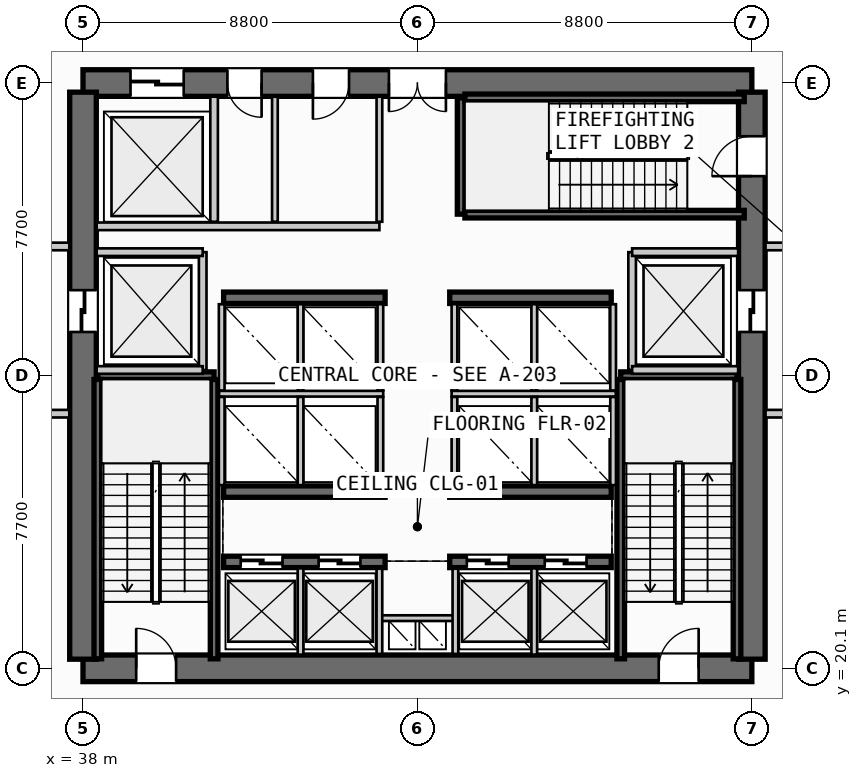
"""IFC4 building model, lengths in metres.
Left out: names, types, materials, properties, quantities, classifications, styles, units other than length and angle.
Written with IfcOpenShell. Run it as: python <this file> out.ifc"""

import sys

from ifc_helpers import new_model, si_unit, direction, frame, frame_2d, origin, place, context, subcontext, project, spatial, rectangle, extrude, source, transform, mapped, element, fill, save


model = new_model("IFC4")
c1 = context("Model", 3, precision=1e-05, world=origin(), true_north=direction((0.0, 1.0)))
c2 = subcontext(c1, "Body", "Model", "MODEL_VIEW")
j1 = project(units=[si_unit("LENGTHUNIT", "METRE"), si_unit("PLANEANGLEUNIT", "RADIAN")], contexts=[c1])
p1 = place(None, origin())
s1 = spatial("IfcSite", under=j1, at=p1, CompositionType="ELEMENT")
p2 = place(p1, origin())
s2 = spatial("IfcBuilding", under=s1, at=p2, CompositionType="ELEMENT")
p3 = place(p2, frame((0.0, 0.0, 10.0)))
s3 = spatial("IfcBuildingStorey", under=s2, at=p3, CompositionType="ELEMENT", Elevation=10.0)
p4 = place(p3, frame((38.0, 20.1, 0.0), z_axis=(0.0, 0.0, 1.0), x_axis=(1.0, 0.0, 0.0)))
e1 = element("IfcWall", 1, at=p4, inside=s3, PredefinedType="SHEAR", context=c2, shape_type="SweptSolid", body=[
    extrude(rectangle(XDim=17.6, YDim=0.7, at=frame_2d((8.8, 0.0))), origin(), (0.0, 0.0, 1.0), 4.53),
])
p5 = place(p4, frame((1.4, 0.0, 0.0)))
e2 = element("IfcOpeningElement", 2, at=p5, cuts=e1, PredefinedType="OPENING", context=c2, shape_type="SweptSolid", body=[
    extrude(rectangle(XDim=1.05, YDim=2.15, at=frame_2d((0.525, 1.075))), frame((0.0, 0.36, 0.0), z_axis=(0.0, -1.0, 0.0), x_axis=(1.0, 0.0, 0.0)), (0.0, 0.0, 1.0), 0.72),
])
p6 = place(p4, frame((15.15, 0.0, 0.0)))
e3 = element("IfcOpeningElement", 3, at=p6, cuts=e1, PredefinedType="OPENING", context=c2, shape_type="SweptSolid", body=[
    extrude(rectangle(XDim=1.05, YDim=2.15, at=frame_2d((0.525, 1.075))), frame((0.0, 0.36, 0.0), z_axis=(0.0, -1.0, 0.0), x_axis=(1.0, 0.0, 0.0)), (0.0, 0.0, 1.0), 0.72),
])
p7 = place(p3, frame((55.6, 35.5, 0.0), z_axis=(0.0, 0.0, 1.0), x_axis=(-1.0, 0.0, 0.0)))
e4 = element("IfcWall", 4, at=p7, inside=s3, PredefinedType="SHEAR", context=c2, shape_type="SweptSolid", body=[
    extrude(rectangle(XDim=17.6, YDim=0.7, at=frame_2d((8.8, 0.0))), origin(), (0.0, 0.0, 1.0), 4.53),
])
p8 = place(p7, frame((8.05, 0.0, 0.0)))
e5 = element("IfcOpeningElement", 5, at=p8, cuts=e4, PredefinedType="OPENING", context=c2, shape_type="SweptSolid", body=[
    extrude(rectangle(XDim=1.5, YDim=2.2, at=frame_2d((0.75, 1.1))), frame((0.0, 0.36, 0.0), z_axis=(0.0, -1.0, 0.0), x_axis=(1.0, 0.0, 0.0)), (0.0, 0.0, 1.0), 0.72),
])
p9 = place(p7, frame((14.95, 0.0, 0.0)))
e6 = element("IfcOpeningElement", 6, at=p9, cuts=e4, PredefinedType="OPENING", context=c2, shape_type="SweptSolid", body=[
    extrude(rectangle(XDim=1.4, YDim=2.3, at=frame_2d((0.7, 1.15))), frame((0.0, 0.36, 0.0), z_axis=(0.0, -1.0, 0.0), x_axis=(1.0, 0.0, 0.0)), (0.0, 0.0, 1.0), 0.72),
])
p10 = place(p7, frame((12.9, 0.0, 0.0)))
e7 = element("IfcOpeningElement", 7, at=p10, cuts=e4, PredefinedType="OPENING", context=c2, shape_type="SweptSolid", body=[
    extrude(rectangle(XDim=0.9, YDim=2.15, at=frame_2d((0.45, 1.075))), frame((0.0, 0.36, 0.0), z_axis=(0.0, -1.0, 0.0), x_axis=(1.0, 0.0, 0.0)), (0.0, 0.0, 1.0), 0.72),
])
p11 = place(p7, frame((10.6, 0.0, 0.0)))
e8 = element("IfcOpeningElement", 8, at=p11, cuts=e4, PredefinedType="OPENING", context=c2, shape_type="SweptSolid", body=[
    extrude(rectangle(XDim=0.95, YDim=2.15, at=frame_2d((0.475, 1.075))), frame((0.0, 0.36, 0.0), z_axis=(0.0, -1.0, 0.0), x_axis=(1.0, 0.0, 0.0)), (0.0, 0.0, 1.0), 0.72),
])
p12 = place(p3, frame((38.0, 35.26, 0.0), z_axis=(0.0, 0.0, 1.0), x_axis=(0.0, -1.0, 0.0)))
e9 = element("IfcWall", 9, at=p12, inside=s3, PredefinedType="SHEAR", context=c2, shape_type="SweptSolid", body=[
    extrude(rectangle(XDim=14.92, YDim=0.7, at=frame_2d((7.46, 0.0))), origin(), (0.0, 0.0, 1.0), 4.53),
])
p13 = place(p12, frame((5.21, 0.0, 0.0)))
e10 = element("IfcOpeningElement", 10, at=p13, cuts=e9, PredefinedType="OPENING", context=c2, shape_type="SweptSolid", body=[
    extrude(rectangle(XDim=1.1, YDim=2.2, at=frame_2d((0.55, 1.1))), frame((0.0, 0.36, 0.0), z_axis=(0.0, -1.0, 0.0), x_axis=(1.0, 0.0, 0.0)), (0.0, 0.0, 1.0), 0.72),
])
p14 = place(p3, frame((55.6, 20.34, 0.0), z_axis=(0.0, 0.0, 1.0), x_axis=(0.0, 1.0, 0.0)))
e11 = element("IfcWall", 11, at=p14, inside=s3, PredefinedType="SHEAR", context=c2, shape_type="SweptSolid", body=[
    extrude(rectangle(XDim=14.92, YDim=0.7, at=frame_2d((7.46, 0.0))), origin(), (0.0, 0.0, 1.0), 4.53),
])
p15 = place(p14, frame((12.71, 0.0, 0.0)))
e12 = element("IfcOpeningElement", 12, at=p15, cuts=e11, PredefinedType="OPENING", context=c2, shape_type="SweptSolid", body=[
    extrude(rectangle(XDim=1.05, YDim=2.15, at=frame_2d((0.525, 1.075))), frame((0.0, 0.36, 0.0), z_axis=(0.0, -1.0, 0.0), x_axis=(1.0, 0.0, 0.0)), (0.0, 0.0, 1.0), 0.72),
])
p16 = place(p14, frame((8.61, 0.0, 0.0)))
e13 = element("IfcOpeningElement", 13, at=p16, cuts=e11, PredefinedType="OPENING", context=c2, shape_type="SweptSolid", body=[
    extrude(rectangle(XDim=1.1, YDim=2.2, at=frame_2d((0.55, 1.1))), frame((0.0, 0.36, 0.0), z_axis=(0.0, -1.0, 0.0), x_axis=(1.0, 0.0, 0.0)), (0.0, 0.0, 1.0), 0.72),
])
p17 = place(p3, frame((41.7, 22.9, 0.0), z_axis=(0.0, 0.0, 1.0), x_axis=(1.0, 0.0, 0.0)))
e14 = element("IfcWall", 14, at=p17, inside=s3, PredefinedType="SHEAR", context=c2, shape_type="SweptSolid", body=[
    extrude(rectangle(XDim=4.25, YDim=0.3, at=frame_2d((2.125, 0.0))), origin(), (0.0, 0.0, 1.0), 4.53),
])
p18 = place(p17, frame((0.45, 0.0, 0.0)))
e15 = element("IfcOpeningElement", 15, at=p18, cuts=e14, PredefinedType="OPENING", context=c2, shape_type="SweptSolid", body=[
    extrude(rectangle(XDim=1.1, YDim=2.2, at=frame_2d((0.55, 1.1))), frame((0.0, 0.16, 0.0), z_axis=(0.0, -1.0, 0.0), x_axis=(1.0, 0.0, 0.0)), (0.0, 0.0, 1.0), 0.32),
])
p19 = place(p17, frame((2.5, 0.0, 0.0)))
e16 = element("IfcOpeningElement", 16, at=p19, cuts=e14, PredefinedType="OPENING", context=c2, shape_type="SweptSolid", body=[
    extrude(rectangle(XDim=1.1, YDim=2.2, at=frame_2d((0.55, 1.1))), frame((0.0, 0.16, 0.0), z_axis=(0.0, -1.0, 0.0), x_axis=(1.0, 0.0, 0.0)), (0.0, 0.0, 1.0), 0.32),
])
p20 = place(p3, frame((47.65, 22.9, 0.0), z_axis=(0.0, 0.0, 1.0), x_axis=(1.0, 0.0, 0.0)))
e17 = element("IfcWall", 17, at=p20, inside=s3, PredefinedType="SHEAR", context=c2, shape_type="SweptSolid", body=[
    extrude(rectangle(XDim=4.25, YDim=0.3, at=frame_2d((2.125, 0.0))), origin(), (0.0, 0.0, 1.0), 4.53),
])
p21 = place(p20, frame((0.45, 0.0, 0.0)))
e18 = element("IfcOpeningElement", 18, at=p21, cuts=e17, PredefinedType="OPENING", context=c2, shape_type="SweptSolid", body=[
    extrude(rectangle(XDim=1.1, YDim=2.2, at=frame_2d((0.55, 1.1))), frame((0.0, 0.16, 0.0), z_axis=(0.0, -1.0, 0.0), x_axis=(1.0, 0.0, 0.0)), (0.0, 0.0, 1.0), 0.32),
])
p22 = place(p20, frame((2.5, 0.0, 0.0)))
e19 = element("IfcOpeningElement", 19, at=p22, cuts=e17, PredefinedType="OPENING", context=c2, shape_type="SweptSolid", body=[
    extrude(rectangle(XDim=1.1, YDim=2.2, at=frame_2d((0.55, 1.1))), frame((0.0, 0.16, 0.0), z_axis=(0.0, -1.0, 0.0), x_axis=(1.0, 0.0, 0.0)), (0.0, 0.0, 1.0), 0.32),
])
for number, where, z_axis, x_axis in (
    (20, (41.7, 24.75, 0.0), (0.0, 0.0, 1.0), (1.0, 0.0, 0.0)),
    (21, (47.65, 24.75, 0.0), (0.0, 0.0, 1.0), (1.0, 0.0, 0.0)),
    (22, (41.7, 29.85, 0.0), (0.0, 0.0, 1.0), (1.0, 0.0, 0.0)),
    (23, (47.65, 29.85, 0.0), (0.0, 0.0, 1.0), (1.0, 0.0, 0.0)),
):
    element("IfcWall", number, at=place(p3, frame(where, z_axis=z_axis, x_axis=x_axis)), inside=s3, PredefinedType="SHEAR", context=c2, shape_type="SweptSolid", body=[
        extrude(rectangle(XDim=4.25, YDim=0.3, at=frame_2d((2.125, 0.0))), origin(), (0.0, 0.0, 1.0), 4.53),
    ])
p23 = place(p3, frame((38.39, 27.8, 0.0), z_axis=(0.0, 0.0, 1.0), x_axis=(1.0, 0.0, 0.0)))
e24 = element("IfcWall", 24, at=p23, inside=s3, PredefinedType="SHEAR", context=c2, shape_type="SweptSolid", body=[
    extrude(rectangle(XDim=3.06, YDim=0.2, at=frame_2d((1.53, 0.0))), origin(), (0.0, 0.0, 1.0), 4.53),
])
for number, where, z_axis, x_axis in (
    (25, (41.45, 27.7, 0.0), (0.0, 0.0, 1.0), (0.0, -1.0, 0.0)),
    (26, (38.39, 20.35, 0.0), (0.0, 0.0, 1.0), (0.0, 1.0, 0.0)),
):
    element("IfcWall", number, at=place(p3, frame(where, z_axis=z_axis, x_axis=x_axis)), inside=s3, PredefinedType="SHEAR", context=c2, shape_type="SweptSolid", body=[
        extrude(rectangle(XDim=7.35, YDim=0.2, at=frame_2d((3.675, 0.0))), origin(), (0.0, 0.0, 1.0), 4.53),
    ])
p24 = place(p3, frame((52.15, 27.8, 0.0), z_axis=(0.0, 0.0, 1.0), x_axis=(1.0, 0.0, 0.0)))
e27 = element("IfcWall", 27, at=p24, inside=s3, PredefinedType="SHEAR", context=c2, shape_type="SweptSolid", body=[
    extrude(rectangle(XDim=3.06, YDim=0.2, at=frame_2d((1.53, 0.0))), origin(), (0.0, 0.0, 1.0), 4.53),
])
for number, where, z_axis, x_axis in (
    (28, (55.21, 27.7, 0.0), (0.0, 0.0, 1.0), (0.0, -1.0, 0.0)),
    (29, (52.15, 20.35, 0.0), (0.0, 0.0, 1.0), (0.0, 1.0, 0.0)),
):
    element("IfcWall", number, at=place(p3, frame(where, z_axis=z_axis, x_axis=x_axis)), inside=s3, PredefinedType="SHEAR", context=c2, shape_type="SweptSolid", body=[
        extrude(rectangle(XDim=7.35, YDim=0.2, at=frame_2d((3.675, 0.0))), origin(), (0.0, 0.0, 1.0), 4.53),
    ])
p25 = place(p3, frame((47.95, 32.05, 0.0), z_axis=(0.0, 0.0, 1.0), x_axis=(0.0, 1.0, 0.0)))
e30 = element("IfcWall", 30, at=p25, inside=s3, PredefinedType="SHEAR", context=c2, shape_type="SweptSolid", body=[
    extrude(rectangle(XDim=3.06, YDim=0.2, at=frame_2d((1.53, 0.0))), origin(), (0.0, 0.0, 1.0), 4.53),
])
for number, where, z_axis, x_axis in (
    (31, (48.05, 35.11, 0.0), (0.0, 0.0, 1.0), (1.0, 0.0, 0.0)),
    (32, (55.4, 32.05, 0.0), (0.0, 0.0, 1.0), (-1.0, 0.0, 0.0)),
):
    element("IfcWall", number, at=place(p3, frame(where, z_axis=z_axis, x_axis=x_axis)), inside=s3, PredefinedType="SHEAR", context=c2, shape_type="SweptSolid", body=[
        extrude(rectangle(XDim=7.35, YDim=0.2, at=frame_2d((3.675, 0.0))), origin(), (0.0, 0.0, 1.0), 4.53),
    ])
p26 = place(p3, frame((45.8, 21.42, 0.0), z_axis=(0.0, 0.0, 1.0), x_axis=(1.0, 0.0, 0.0)))
e33 = element("IfcWall", 33, at=p26, inside=s3, PredefinedType="PARTITIONING", context=c2, shape_type="SweptSolid", body=[
    extrude(rectangle(XDim=2.0, YDim=0.15, at=frame_2d((1.0, 0.0))), origin(), (0.0, 0.0, 1.0), 3.743),
])
for number, where, z_axis, x_axis in (
    (34, (45.8, 20.48, 0.0), (0.0, 0.0, 1.0), (0.0, 1.0, 0.0)),
    (35, (47.8, 20.48, 0.0), (0.0, 0.0, 1.0), (0.0, 1.0, 0.0)),
):
    element("IfcWall", number, at=place(p3, frame(where, z_axis=z_axis, x_axis=x_axis)), inside=s3, PredefinedType="PARTITIONING", context=c2, shape_type="SweptSolid", body=[
        extrude(rectangle(XDim=2.24, YDim=0.15, at=frame_2d((1.12, 0.0))), origin(), (0.0, 0.0, 1.0), 3.743),
    ])
p27 = place(p3, frame((41.15, 27.95, 0.0), z_axis=(0.0, 0.0, 1.0), x_axis=(0.0, 1.0, 0.0)))
e36 = element("IfcWall", 36, at=p27, inside=s3, PredefinedType="PARTITIONING", context=c2, shape_type="SweptSolid", body=[
    extrude(rectangle(XDim=3.1, YDim=0.2, at=frame_2d((1.55, 0.0))), origin(), (0.0, 0.0, 1.0), 3.743),
])
for number, where, z_axis, x_axis in (
    (37, (38.36, 27.95, 0.0), (0.0, 0.0, 1.0), (1.0, 0.0, 0.0)),
    (38, (38.36, 31.05, 0.0), (0.0, 0.0, 1.0), (1.0, 0.0, 0.0)),
):
    element("IfcWall", number, at=place(p3, frame(where, z_axis=z_axis, x_axis=x_axis)), inside=s3, PredefinedType="PARTITIONING", context=c2, shape_type="SweptSolid", body=[
        extrude(rectangle(XDim=2.79, YDim=0.2, at=frame_2d((1.395, 0.0))), origin(), (0.0, 0.0, 1.0), 3.743),
    ])
for number, where, z_axis, x_axis in (
    (39, (34.5, 26.8, 0.0), (0.0, 0.0, 1.0), (1.0, 0.0, 0.0)),
    (40, (34.5, 31.2, 0.0), (0.0, 0.0, 1.0), (1.0, 0.0, 0.0)),
):
    element("IfcWall", number, at=place(p3, frame(where, z_axis=z_axis, x_axis=x_axis)), inside=s3, PredefinedType="PARTITIONING", context=c2, shape_type="SweptSolid", body=[
        extrude(rectangle(XDim=3.14, YDim=0.2, at=frame_2d((1.57, 0.0))), origin(), (0.0, 0.0, 1.0), 3.743),
    ])
p28 = place(p3, frame((52.45, 27.95, 0.0), z_axis=(0.0, 0.0, 1.0), x_axis=(0.0, 1.0, 0.0)))
e41 = element("IfcWall", 41, at=p28, inside=s3, PredefinedType="PARTITIONING", context=c2, shape_type="SweptSolid", body=[
    extrude(rectangle(XDim=3.1, YDim=0.2, at=frame_2d((1.55, 0.0))), origin(), (0.0, 0.0, 1.0), 3.743),
])
for number, where, z_axis, x_axis in (
    (42, (52.45, 27.95, 0.0), (0.0, 0.0, 1.0), (1.0, 0.0, 0.0)),
    (43, (52.45, 31.05, 0.0), (0.0, 0.0, 1.0), (1.0, 0.0, 0.0)),
):
    element("IfcWall", number, at=place(p3, frame(where, z_axis=z_axis, x_axis=x_axis)), inside=s3, PredefinedType="PARTITIONING", context=c2, shape_type="SweptSolid", body=[
        extrude(rectangle(XDim=2.79, YDim=0.2, at=frame_2d((1.395, 0.0))), origin(), (0.0, 0.0, 1.0), 3.743),
    ])
for number, where, z_axis, x_axis in (
    (44, (55.96, 26.8, 0.0), (0.0, 0.0, 1.0), (1.0, 0.0, 0.0)),
    (45, (55.96, 31.2, 0.0), (0.0, 0.0, 1.0), (1.0, 0.0, 0.0)),
):
    element("IfcWall", number, at=place(p3, frame(where, z_axis=z_axis, x_axis=x_axis)), inside=s3, PredefinedType="PARTITIONING", context=c2, shape_type="SweptSolid", body=[
        extrude(rectangle(XDim=3.14, YDim=0.2, at=frame_2d((1.57, 0.0))), origin(), (0.0, 0.0, 1.0), 3.743),
    ])
for number, where, z_axis, x_axis in (
    (46, (43.725, 20.46, 0.0), (0.0, 0.0, 1.0), (0.0, 1.0, 0.0)),
    (47, (49.875, 20.46, 0.0), (0.0, 0.0, 1.0), (0.0, 1.0, 0.0)),
):
    element("IfcWall", number, at=place(p3, frame(where, z_axis=z_axis, x_axis=x_axis)), inside=s3, PredefinedType="PARTITIONING", context=c2, shape_type="SweptSolid", body=[
        extrude(rectangle(XDim=2.27, YDim=0.15, at=frame_2d((1.135, 0.0))), origin(), (0.0, 0.0, 1.0), 3.743),
    ])
p29 = place(p3, frame((41.58, 27.325, 0.0), z_axis=(0.0, 0.0, 1.0), x_axis=(1.0, 0.0, 0.0)))
e48 = element("IfcWall", 48, at=p29, inside=s3, PredefinedType="PARTITIONING", context=c2, shape_type="SweptSolid", body=[
    extrude(rectangle(XDim=4.32, YDim=0.15, at=frame_2d((2.16, 0.0))), origin(), (0.0, 0.0, 1.0), 3.743),
])
p30 = place(p3, frame((47.7, 27.325, 0.0), z_axis=(0.0, 0.0, 1.0), x_axis=(1.0, 0.0, 0.0)))
e49 = element("IfcWall", 49, at=p30, inside=s3, PredefinedType="PARTITIONING", context=c2, shape_type="SweptSolid", body=[
    extrude(rectangle(XDim=4.32, YDim=0.15, at=frame_2d((2.16, 0.0))), origin(), (0.0, 0.0, 1.0), 3.743),
])
for number, where, z_axis, x_axis in (
    (50, (41.65, 24.92, 0.0), (0.0, 0.0, 1.0), (0.0, 1.0, 0.0)),
    (51, (43.725, 24.92, 0.0), (0.0, 0.0, 1.0), (0.0, 1.0, 0.0)),
    (52, (45.825, 24.92, 0.0), (0.0, 0.0, 1.0), (0.0, 1.0, 0.0)),
    (53, (47.775, 24.92, 0.0), (0.0, 0.0, 1.0), (0.0, 1.0, 0.0)),
    (54, (49.875, 24.92, 0.0), (0.0, 0.0, 1.0), (0.0, 1.0, 0.0)),
    (55, (51.95, 24.92, 0.0), (0.0, 0.0, 1.0), (0.0, 1.0, 0.0)),
):
    element("IfcWall", number, at=place(p3, frame(where, z_axis=z_axis, x_axis=x_axis)), inside=s3, PredefinedType="PARTITIONING", context=c2, shape_type="SweptSolid", body=[
        extrude(rectangle(XDim=2.32, YDim=0.15, at=frame_2d((1.16, 0.0))), origin(), (0.0, 0.0, 1.0), 3.743),
    ])
for number, where, z_axis, x_axis in (
    (56, (41.65, 27.41, 0.0), (0.0, 0.0, 1.0), (0.0, 1.0, 0.0)),
    (57, (43.725, 27.41, 0.0), (0.0, 0.0, 1.0), (0.0, 1.0, 0.0)),
    (58, (45.825, 27.41, 0.0), (0.0, 0.0, 1.0), (0.0, 1.0, 0.0)),
    (59, (47.775, 27.41, 0.0), (0.0, 0.0, 1.0), (0.0, 1.0, 0.0)),
    (60, (49.875, 27.41, 0.0), (0.0, 0.0, 1.0), (0.0, 1.0, 0.0)),
    (61, (51.95, 27.41, 0.0), (0.0, 0.0, 1.0), (0.0, 1.0, 0.0)),
):
    element("IfcWall", number, at=place(p3, frame(where, z_axis=z_axis, x_axis=x_axis)), inside=s3, PredefinedType="PARTITIONING", context=c2, shape_type="SweptSolid", body=[
        extrude(rectangle(XDim=2.27, YDim=0.15, at=frame_2d((1.135, 0.0))), origin(), (0.0, 0.0, 1.0), 3.743),
    ])
p31 = place(p3, frame((41.45, 31.85, 0.0), z_axis=(0.0, 0.0, 1.0), x_axis=(0.0, 1.0, 0.0)))
e62 = element("IfcWall", 62, at=p31, inside=s3, PredefinedType="PARTITIONING", context=c2, shape_type="SweptSolid", body=[
    extrude(rectangle(XDim=3.29, YDim=0.2, at=frame_2d((1.645, 0.0))), origin(), (0.0, 0.0, 1.0), 3.743),
])
p32 = place(p3, frame((38.36, 31.73, 0.0), z_axis=(0.0, 0.0, 1.0), x_axis=(1.0, 0.0, 0.0)))
e63 = element("IfcWall", 63, at=p32, inside=s3, PredefinedType="PARTITIONING", context=c2, shape_type="SweptSolid", body=[
    extrude(rectangle(XDim=7.44, YDim=0.2, at=frame_2d((3.72, 0.0))), origin(), (0.0, 0.0, 1.0), 3.743),
])
p33 = place(p3, frame((45.8, 31.85, 0.0), z_axis=(0.0, 0.0, 1.0), x_axis=(0.0, 1.0, 0.0)))
e64 = element("IfcWall", 64, at=p33, inside=s3, PredefinedType="PARTITIONING", context=c2, shape_type="SweptSolid", body=[
    extrude(rectangle(XDim=3.29, YDim=0.15, at=frame_2d((1.645, 0.0))), origin(), (0.0, 0.0, 1.0), 3.743),
])
p34 = place(p3, frame((43.05, 31.85, 0.0), z_axis=(0.0, 0.0, 1.0), x_axis=(0.0, 1.0, 0.0)))
e65 = element("IfcWall", 65, at=p34, inside=s3, PredefinedType="PLUMBINGWALL", context=c2, shape_type="SweptSolid", body=[
    extrude(rectangle(XDim=3.29, YDim=0.15, at=frame_2d((1.645, 0.0))), origin(), (0.0, 0.0, 1.0), 3.743),
])
m1 = source(origin(), c2, "Body", "SweptSolid", [
    extrude(rectangle(XDim=1.05, YDim=2.15, at=frame_2d((0.525, 1.075))), frame((0.0, 0.025, 0.0), z_axis=(0.0, -1.0, 0.0), x_axis=(1.0, 0.0, 0.0)), (0.0, 0.0, 1.0), 0.05),
])
p35 = place(p5, origin())
e66 = element("IfcDoor", 66, at=p35, inside=s3, OperationType="SINGLE_SWING_LEFT", PredefinedType="DOOR", context=c2, shape_type="MappedRepresentation", body=[
    mapped(m1, transform((0.0, 0.0, 0.0), scale=1.0)),
])
fill(e2, e66)
p36 = place(p6, origin())
e67 = element("IfcDoor", 67, at=p36, inside=s3, OperationType="SINGLE_SWING_RIGHT", PredefinedType="DOOR", context=c2, shape_type="MappedRepresentation", body=[
    mapped(m1, transform((0.0, 0.0, 0.0), scale=1.0)),
])
fill(e3, e67)
p37 = place(p15, origin())
e68 = element("IfcDoor", 68, at=p37, inside=s3, OperationType="SINGLE_SWING_LEFT", PredefinedType="DOOR", context=c2, shape_type="MappedRepresentation", body=[
    mapped(m1, transform((0.0, 0.0, 0.0), scale=1.0)),
])
fill(e12, e68)
m2 = source(origin(), c2, "Body", "SweptSolid", [
    extrude(rectangle(XDim=1.5, YDim=2.2, at=frame_2d((0.75, 1.1))), frame((0.0, 0.025, 0.0), z_axis=(0.0, -1.0, 0.0), x_axis=(1.0, 0.0, 0.0)), (0.0, 0.0, 1.0), 0.05),
])
p38 = place(p8, origin())
e69 = element("IfcDoor", 69, at=p38, inside=s3, OperationType="DOUBLE_DOOR_SINGLE_SWING", PredefinedType="DOOR", context=c2, shape_type="MappedRepresentation", body=[
    mapped(m2, transform((0.0, 0.0, 0.0), scale=1.0)),
])
fill(e5, e69)
m3 = source(origin(), c2, "Body", "SweptSolid", [
    extrude(rectangle(XDim=1.1, YDim=2.2, at=frame_2d((0.55, 1.1))), frame((0.0, 0.025, 0.0), z_axis=(0.0, -1.0, 0.0), x_axis=(1.0, 0.0, 0.0)), (0.0, 0.0, 1.0), 0.05),
])
p39 = place(p13, origin())
e70 = element("IfcDoor", 70, at=p39, inside=s3, OperationType="SLIDING_TO_LEFT", PredefinedType="DOOR", context=c2, shape_type="MappedRepresentation", body=[
    mapped(m3, transform((0.0, 0.0, 0.0), scale=1.0)),
])
fill(e10, e70)
p40 = place(p16, origin())
e71 = element("IfcDoor", 71, at=p40, inside=s3, OperationType="SLIDING_TO_RIGHT", PredefinedType="DOOR", context=c2, shape_type="MappedRepresentation", body=[
    mapped(m3, transform((0.0, 0.0, 0.0), scale=1.0)),
])
fill(e13, e71)
p41 = place(p18, origin())
e72 = element("IfcDoor", 72, at=p41, inside=s3, OperationType="SLIDING_TO_LEFT", PredefinedType="DOOR", context=c2, shape_type="MappedRepresentation", body=[
    mapped(m3, transform((0.0, 0.0, 0.0), scale=1.0)),
])
fill(e15, e72)
p42 = place(p19, origin())
e73 = element("IfcDoor", 73, at=p42, inside=s3, OperationType="SLIDING_TO_LEFT", PredefinedType="DOOR", context=c2, shape_type="MappedRepresentation", body=[
    mapped(m3, transform((0.0, 0.0, 0.0), scale=1.0)),
])
fill(e16, e73)
p43 = place(p21, origin())
e74 = element("IfcDoor", 74, at=p43, inside=s3, OperationType="SLIDING_TO_LEFT", PredefinedType="DOOR", context=c2, shape_type="MappedRepresentation", body=[
    mapped(m3, transform((0.0, 0.0, 0.0), scale=1.0)),
])
fill(e18, e74)
p44 = place(p22, origin())
e75 = element("IfcDoor", 75, at=p44, inside=s3, OperationType="SLIDING_TO_LEFT", PredefinedType="DOOR", context=c2, shape_type="MappedRepresentation", body=[
    mapped(m3, transform((0.0, 0.0, 0.0), scale=1.0)),
])
fill(e19, e75)
m4 = source(origin(), c2, "Body", "SweptSolid", [
    extrude(rectangle(XDim=1.4, YDim=2.3, at=frame_2d((0.7, 1.15))), frame((0.0, 0.025, 0.0), z_axis=(0.0, -1.0, 0.0), x_axis=(1.0, 0.0, 0.0)), (0.0, 0.0, 1.0), 0.05),
])
p45 = place(p9, origin())
e76 = element("IfcDoor", 76, at=p45, inside=s3, OperationType="SLIDING_TO_RIGHT", PredefinedType="DOOR", context=c2, shape_type="MappedRepresentation", body=[
    mapped(m4, transform((0.0, 0.0, 0.0), scale=1.0)),
])
fill(e6, e76)
m5 = source(origin(), c2, "Body", "SweptSolid", [
    extrude(rectangle(XDim=0.9, YDim=2.15, at=frame_2d((0.45, 1.075))), frame((0.0, 0.025, 0.0), z_axis=(0.0, -1.0, 0.0), x_axis=(1.0, 0.0, 0.0)), (0.0, 0.0, 1.0), 0.05),
])
p46 = place(p10, origin())
e77 = element("IfcDoor", 77, at=p46, inside=s3, OperationType="SINGLE_SWING_LEFT", PredefinedType="DOOR", context=c2, shape_type="MappedRepresentation", body=[
    mapped(m5, transform((0.0, 0.0, 0.0), scale=1.0)),
])
fill(e7, e77)
m6 = source(origin(), c2, "Body", "SweptSolid", [
    extrude(rectangle(XDim=0.95, YDim=2.15, at=frame_2d((0.475, 1.075))), frame((0.0, 0.025, 0.0), z_axis=(0.0, -1.0, 0.0), x_axis=(1.0, 0.0, 0.0)), (0.0, 0.0, 1.0), 0.05),
])
p47 = place(p11, origin())
e78 = element("IfcDoor", 78, at=p47, inside=s3, OperationType="SINGLE_SWING_RIGHT", PredefinedType="DOOR", context=c2, shape_type="MappedRepresentation", body=[
    mapped(m6, transform((0.0, 0.0, 0.0), scale=1.0)),
])
fill(e8, e78)
save(model, sys.argv[1])
